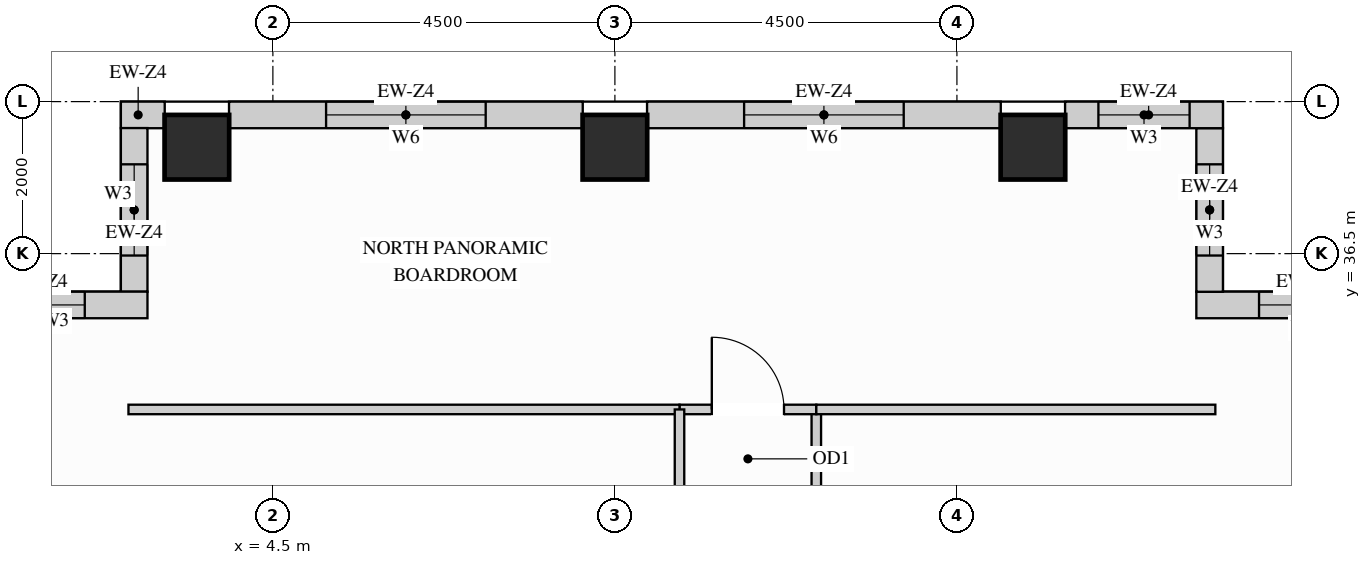
"""IFC4 building model, lengths in metres.
Left out: names, types, materials, properties, quantities, classifications, styles, units other than length and angle.
Written with IfcOpenShell. Run it as: python <this file> out.ifc"""

import sys

from ifc_helpers import new_model, si_unit, direction, frame, frame_2d, origin, origin_2d, place, context, subcontext, project, spatial, rectangle, extrude, source, transform, mapped, element, fill, save


model = new_model("IFC4")
c1 = context("Model", 3, precision=1e-05, world=origin(), true_north=direction((0.0, 1.0)))
c2 = subcontext(c1, "Body", "Model", "MODEL_VIEW")
j1 = project(units=[si_unit("LENGTHUNIT", "METRE"), si_unit("PLANEANGLEUNIT", "RADIAN")], contexts=[c1])
p1 = place(None, origin())
s1 = spatial("IfcSite", under=j1, at=p1, CompositionType="ELEMENT")
p2 = place(p1, origin())
s2 = spatial("IfcBuilding", under=s1, at=p2, CompositionType="ELEMENT")
p3 = place(p2, frame((0.0, 0.0, 248.4)))
s3 = spatial("IfcBuildingStorey", under=s2, at=p3, CompositionType="ELEMENT", Elevation=248.4)
m1 = source(origin(), c2, "Body", "SweptSolid", [
    extrude(rectangle(XDim=0.85, YDim=0.85, at=origin_2d()), origin(), (0.0, 0.0, 1.0), 3.4),
])
for number, where, z_axis, x_axis in (
    (1, (14.5, 37.9, 0.0), (0.0, 0.0, 1.0), (1.0, 0.0, 0.0)),
    (2, (3.5, 37.9, 0.0), (0.0, 0.0, 1.0), (1.0, 0.0, 0.0)),
    (3, (9.0, 37.9, 0.0), (0.0, 0.0, 1.0), (1.0, 0.0, 0.0)),
):
    element("IfcColumn", number, at=place(p3, frame(where, z_axis=z_axis, x_axis=x_axis)), inside=s3, PredefinedType="COLUMN", context=c2, shape_type="MappedRepresentation", body=[
        mapped(m1, transform((0.0, 0.0, 0.0), x_axis=(1.0, 0.0, 0.0), y_axis=(0.0, 1.0, 0.0), z_axis=(0.0, 0.0, 1.0))),
    ])
p4 = place(p3, frame((19.5, 35.825, 0.0), z_axis=(0.0, 0.0, 1.0), x_axis=(-1.0, 0.0, 0.0)))
e4 = element("IfcWall", 4, at=p4, inside=s3, PredefinedType="SOLIDWALL", context=c2, shape_type="SweptSolid", body=[
    extrude(rectangle(XDim=2.85, YDim=0.35, at=frame_2d((1.425, 0.0))), origin(), (0.0, 0.0, 1.0), 3.385),
])
p5 = place(p4, frame((0.825, 0.0, 0.78)))
e5 = element("IfcOpeningElement", 5, at=p5, cuts=e4, PredefinedType="OPENING", context=c2, shape_type="SweptSolid", body=[
    extrude(rectangle(XDim=1.2, YDim=2.25, at=frame_2d((0.6, 1.125))), frame((0.0, 0.185, 0.0), z_axis=(0.0, -1.0, 0.0), x_axis=(1.0, 0.0, 0.0)), (0.0, 0.0, 1.0), 0.37),
])
p6 = place(p3, frame((16.825, 35.998, 0.0), z_axis=(0.0, 0.0, 1.0), x_axis=(0.0, 1.0, 0.0)))
e6 = element("IfcWall", 6, at=p6, inside=s3, PredefinedType="SOLIDWALL", context=c2, shape_type="SweptSolid", body=[
    extrude(rectangle(XDim=2.154, YDim=0.35, at=frame_2d((1.077, 0.0))), origin(), (0.0, 0.0, 1.0), 3.385),
])
p7 = place(p6, frame((0.477, 0.0, 0.78)))
e7 = element("IfcOpeningElement", 7, at=p7, cuts=e6, PredefinedType="OPENING", context=c2, shape_type="SweptSolid", body=[
    extrude(rectangle(XDim=1.2, YDim=2.25, at=frame_2d((0.6, 1.125))), frame((0.0, 0.185, 0.0), z_axis=(0.0, -1.0, 0.0), x_axis=(1.0, 0.0, 0.0)), (0.0, 0.0, 1.0), 0.37),
])
p8 = place(p3, frame((17.0, 38.325, 0.0), z_axis=(0.0, 0.0, 1.0), x_axis=(-1.0, 0.0, 0.0)))
e8 = element("IfcWall", 8, at=p8, inside=s3, PredefinedType="SOLIDWALL", context=c2, shape_type="SweptSolid", body=[
    extrude(rectangle(XDim=2.077, YDim=0.35, at=frame_2d((1.039, 0.0))), origin(), (0.0, 0.0, 1.0), 3.385),
])
p9 = place(p8, frame((0.438, 0.0, 0.78)))
e9 = element("IfcOpeningElement", 9, at=p9, cuts=e8, PredefinedType="OPENING", context=c2, shape_type="SweptSolid", body=[
    extrude(rectangle(XDim=1.2, YDim=2.25, at=frame_2d((0.6, 1.125))), frame((0.0, 0.185, 0.0), z_axis=(0.0, -1.0, 0.0), x_axis=(1.0, 0.0, 0.0)), (0.0, 0.0, 1.0), 0.37),
])
p10 = place(p3, frame((14.077, 38.325, 0.0), z_axis=(0.0, 0.0, 1.0), x_axis=(-1.0, 0.0, 0.0)))
e10 = element("IfcWall", 10, at=p10, inside=s3, PredefinedType="SOLIDWALL", context=c2, shape_type="SweptSolid", body=[
    extrude(rectangle(XDim=4.654, YDim=0.35, at=frame_2d((2.327, 0.0))), origin(), (0.0, 0.0, 1.0), 3.385),
])
p11 = place(p10, frame((1.277, 0.0, 0.78)))
e11 = element("IfcOpeningElement", 11, at=p11, cuts=e10, PredefinedType="OPENING", context=c2, shape_type="SweptSolid", body=[
    extrude(rectangle(XDim=2.1, YDim=2.25, at=frame_2d((1.05, 1.125))), frame((0.0, 0.185, 0.0), z_axis=(0.0, -1.0, 0.0), x_axis=(1.0, 0.0, 0.0)), (0.0, 0.0, 1.0), 0.37),
])
p12 = place(p3, frame((8.577, 38.325, 0.0), z_axis=(0.0, 0.0, 1.0), x_axis=(-1.0, 0.0, 0.0)))
e12 = element("IfcWall", 12, at=p12, inside=s3, PredefinedType="SOLIDWALL", context=c2, shape_type="SweptSolid", body=[
    extrude(rectangle(XDim=4.654, YDim=0.35, at=frame_2d((2.327, 0.0))), origin(), (0.0, 0.0, 1.0), 3.385),
])
p13 = place(p12, frame((1.277, 0.0, 0.78)))
e13 = element("IfcOpeningElement", 13, at=p13, cuts=e12, PredefinedType="OPENING", context=c2, shape_type="SweptSolid", body=[
    extrude(rectangle(XDim=2.1, YDim=2.25, at=frame_2d((1.05, 1.125))), frame((0.0, 0.185, 0.0), z_axis=(0.0, -1.0, 0.0), x_axis=(1.0, 0.0, 0.0)), (0.0, 0.0, 1.0), 0.37),
])
m2 = source(origin(), c2, "Body", "SweptSolid", [
    extrude(rectangle(XDim=0.577, YDim=0.35, at=frame_2d((0.289, 0.0))), origin(), (0.0, 0.0, 1.0), 3.385),
])
p14 = place(p3, frame((3.077, 38.325, 0.0), z_axis=(0.0, 0.0, 1.0), x_axis=(-1.0, 0.0, 0.0)))
e14 = element("IfcWall", 14, at=p14, inside=s3, PredefinedType="SOLIDWALL", context=c2, shape_type="MappedRepresentation", body=[
    mapped(m2, transform((0.0, 0.0, 0.0), x_axis=(1.0, 0.0, 0.0), y_axis=(0.0, 1.0, 0.0), z_axis=(0.0, 0.0, 1.0))),
])
p15 = place(p3, frame((2.675, 38.152, 0.0), z_axis=(0.0, 0.0, 1.0), x_axis=(0.0, -1.0, 0.0)))
e15 = element("IfcWall", 15, at=p15, inside=s3, PredefinedType="SOLIDWALL", context=c2, shape_type="SweptSolid", body=[
    extrude(rectangle(XDim=2.154, YDim=0.35, at=frame_2d((1.077, 0.0))), origin(), (0.0, 0.0, 1.0), 3.385),
])
p16 = place(p15, frame((0.477, 0.0, 0.78)))
e16 = element("IfcOpeningElement", 16, at=p16, cuts=e15, PredefinedType="OPENING", context=c2, shape_type="SweptSolid", body=[
    extrude(rectangle(XDim=1.2, YDim=2.25, at=frame_2d((0.6, 1.125))), frame((0.0, 0.185, 0.0), z_axis=(0.0, -1.0, 0.0), x_axis=(1.0, 0.0, 0.0)), (0.0, 0.0, 1.0), 0.37),
])
p17 = place(p3, frame((2.85, 35.825, 0.0), z_axis=(0.0, 0.0, 1.0), x_axis=(-1.0, 0.0, 0.0)))
e17 = element("IfcWall", 17, at=p17, inside=s3, PredefinedType="SOLIDWALL", context=c2, shape_type="SweptSolid", body=[
    extrude(rectangle(XDim=2.85, YDim=0.35, at=frame_2d((1.425, 0.0))), origin(), (0.0, 0.0, 1.0), 3.385),
])
p18 = place(p17, frame((0.825, 0.0, 0.78)))
e18 = element("IfcOpeningElement", 18, at=p18, cuts=e17, PredefinedType="OPENING", context=c2, shape_type="SweptSolid", body=[
    extrude(rectangle(XDim=1.2, YDim=2.25, at=frame_2d((0.6, 1.125))), frame((0.0, 0.185, 0.0), z_axis=(0.0, -1.0, 0.0), x_axis=(1.0, 0.0, 0.0)), (0.0, 0.0, 1.0), 0.37),
])
p19 = place(p3, frame((11.65, 31.35, 0.0), z_axis=(0.0, 0.0, 1.0), x_axis=(0.0, 1.0, 0.0)))
e19 = element("IfcWall", 19, at=p19, inside=s3, PredefinedType="PARTITIONING", context=c2, shape_type="SweptSolid", body=[
    extrude(rectangle(XDim=3.1, YDim=0.125, at=frame_2d((1.55, 0.0))), origin(), (0.0, 0.0, 1.0), 3.385),
])
p20 = place(p19, frame((1.075, 0.0, 0.0)))
e20 = element("IfcOpeningElement", 20, at=p20, cuts=e19, PredefinedType="OPENING", context=c2, shape_type="SweptSolid", body=[
    extrude(rectangle(XDim=0.95, YDim=2.15, at=frame_2d((0.475, 1.075))), frame((0.0, 0.073, 0.0), z_axis=(0.0, -1.0, 0.0), x_axis=(1.0, 0.0, 0.0)), (0.0, 0.0, 1.0), 0.145),
])
p21 = place(p3, frame((9.85, 34.45, 0.0), z_axis=(0.0, 0.0, 1.0), x_axis=(1.0, 0.0, 0.0)))
e21 = element("IfcWall", 21, at=p21, inside=s3, PredefinedType="PARTITIONING", context=c2, shape_type="SweptSolid", body=[
    extrude(rectangle(XDim=1.8, YDim=0.125, at=frame_2d((0.9, 0.0))), origin(), (0.0, 0.0, 1.0), 3.385),
])
p22 = place(p21, frame((0.425, 0.0, 0.0)))
e22 = element("IfcOpeningElement", 22, at=p22, cuts=e21, PredefinedType="OPENING", context=c2, shape_type="SweptSolid", body=[
    extrude(rectangle(XDim=0.95, YDim=2.15, at=frame_2d((0.475, 1.075))), frame((0.0, 0.073, 0.0), z_axis=(0.0, -1.0, 0.0), x_axis=(1.0, 0.0, 0.0)), (0.0, 0.0, 1.0), 0.145),
])
m3 = source(origin(), c2, "Body", "SweptSolid", [
    extrude(rectangle(XDim=5.25, YDim=0.125, at=frame_2d((2.625, 0.0))), origin(), (0.0, 0.0, 1.0), 3.385),
])
p23 = place(p3, frame((11.65, 34.45, 0.0), z_axis=(0.0, 0.0, 1.0), x_axis=(1.0, 0.0, 0.0)))
e23 = element("IfcWall", 23, at=p23, inside=s3, PredefinedType="PARTITIONING", context=c2, shape_type="MappedRepresentation", body=[
    mapped(m3, transform((0.0, 0.0, 0.0), x_axis=(1.0, 0.0, 0.0), y_axis=(0.0, 1.0, 0.0), z_axis=(0.0, 0.0, 1.0))),
])
m4 = source(origin(), c2, "Body", "SweptSolid", [
    extrude(rectangle(XDim=7.25, YDim=0.125, at=frame_2d((3.625, 0.0))), origin(), (0.0, 0.0, 1.0), 3.385),
])
p24 = place(p3, frame((2.6, 34.45, 0.0), z_axis=(0.0, 0.0, 1.0), x_axis=(1.0, 0.0, 0.0)))
e24 = element("IfcWall", 24, at=p24, inside=s3, PredefinedType="PARTITIONING", context=c2, shape_type="MappedRepresentation", body=[
    mapped(m4, transform((0.0, 0.0, 0.0), x_axis=(1.0, 0.0, 0.0), y_axis=(0.0, 1.0, 0.0), z_axis=(0.0, 0.0, 1.0))),
])
p25 = place(p3, frame((9.85, 31.35, 0.0), z_axis=(0.0, 0.0, 1.0), x_axis=(0.0, 1.0, 0.0)))
e25 = element("IfcWall", 25, at=p25, inside=s3, PredefinedType="PARTITIONING", context=c2, shape_type="SweptSolid", body=[
    extrude(rectangle(XDim=3.1, YDim=0.125, at=frame_2d((1.55, 0.0))), origin(), (0.0, 0.0, 1.0), 3.385),
])
p26 = place(p25, frame((1.075, 0.0, 0.0)))
e26 = element("IfcOpeningElement", 26, at=p26, cuts=e25, PredefinedType="OPENING", context=c2, shape_type="SweptSolid", body=[
    extrude(rectangle(XDim=0.95, YDim=2.15, at=frame_2d((0.475, 1.075))), frame((0.0, 0.073, 0.0), z_axis=(0.0, -1.0, 0.0), x_axis=(1.0, 0.0, 0.0)), (0.0, 0.0, 1.0), 0.145),
])
m5 = source(origin(), c2, "Body", "SweptSolid", [
    extrude(rectangle(XDim=0.95, YDim=2.15, at=frame_2d((0.475, 1.075))), frame((0.0, 0.025, 0.0), z_axis=(0.0, -1.0, 0.0), x_axis=(1.0, 0.0, 0.0)), (0.0, 0.0, 1.0), 0.05),
])
p27 = place(p22, origin())
e27 = element("IfcDoor", 27, at=p27, inside=s3, OperationType="SINGLE_SWING_LEFT", PredefinedType="DOOR", context=c2, shape_type="MappedRepresentation", body=[
    mapped(m5, transform((0.0, 0.0, 0.0), x_axis=(1.0, 0.0, 0.0), y_axis=(0.0, 1.0, 0.0), z_axis=(0.0, 0.0, 1.0))),
])
fill(e22, e27)
m6 = source(origin(), c2, "Body", "SweptSolid", [
    extrude(rectangle(XDim=1.2, YDim=2.25, at=frame_2d((0.6, 1.125))), frame((0.0, 0.03, 0.0), z_axis=(0.0, -1.0, 0.0), x_axis=(1.0, 0.0, 0.0)), (0.0, 0.0, 1.0), 0.06),
])
p28 = place(p5, origin())
e28 = element("IfcWindow", 28, at=p28, inside=s3, PartitioningType="SINGLE_PANEL", PredefinedType="WINDOW", context=c2, shape_type="MappedRepresentation", body=[
    mapped(m6, transform((0.0, 0.0, 0.0), x_axis=(1.0, 0.0, 0.0), y_axis=(0.0, 1.0, 0.0), z_axis=(0.0, 0.0, 1.0))),
])
fill(e5, e28)
p29 = place(p7, origin())
e29 = element("IfcWindow", 29, at=p29, inside=s3, PartitioningType="SINGLE_PANEL", PredefinedType="WINDOW", context=c2, shape_type="MappedRepresentation", body=[
    mapped(m6, transform((0.0, 0.0, 0.0), x_axis=(1.0, 0.0, 0.0), y_axis=(0.0, 1.0, 0.0), z_axis=(0.0, 0.0, 1.0))),
])
fill(e7, e29)
p30 = place(p9, origin())
e30 = element("IfcWindow", 30, at=p30, inside=s3, PartitioningType="SINGLE_PANEL", PredefinedType="WINDOW", context=c2, shape_type="MappedRepresentation", body=[
    mapped(m6, transform((0.0, 0.0, 0.0), x_axis=(1.0, 0.0, 0.0), y_axis=(0.0, 1.0, 0.0), z_axis=(0.0, 0.0, 1.0))),
])
fill(e9, e30)
p31 = place(p16, origin())
e31 = element("IfcWindow", 31, at=p31, inside=s3, PartitioningType="SINGLE_PANEL", PredefinedType="WINDOW", context=c2, shape_type="MappedRepresentation", body=[
    mapped(m6, transform((0.0, 0.0, 0.0), x_axis=(1.0, 0.0, 0.0), y_axis=(0.0, 1.0, 0.0), z_axis=(0.0, 0.0, 1.0))),
])
fill(e16, e31)
p32 = place(p18, origin())
e32 = element("IfcWindow", 32, at=p32, inside=s3, PartitioningType="SINGLE_PANEL", PredefinedType="WINDOW", context=c2, shape_type="MappedRepresentation", body=[
    mapped(m6, transform((0.0, 0.0, 0.0), x_axis=(1.0, 0.0, 0.0), y_axis=(0.0, 1.0, 0.0), z_axis=(0.0, 0.0, 1.0))),
])
fill(e18, e32)
m7 = source(origin(), c2, "Body", "SweptSolid", [
    extrude(rectangle(XDim=2.1, YDim=2.25, at=frame_2d((1.05, 1.125))), frame((0.0, 0.03, 0.0), z_axis=(0.0, -1.0, 0.0), x_axis=(1.0, 0.0, 0.0)), (0.0, 0.0, 1.0), 0.06),
])
p33 = place(p11, origin())
e33 = element("IfcWindow", 33, at=p33, inside=s3, PartitioningType="SINGLE_PANEL", PredefinedType="WINDOW", context=c2, shape_type="MappedRepresentation", body=[
    mapped(m7, transform((0.0, 0.0, 0.0), x_axis=(1.0, 0.0, 0.0), y_axis=(0.0, 1.0, 0.0), z_axis=(0.0, 0.0, 1.0))),
])
fill(e11, e33)
p34 = place(p13, origin())
e34 = element("IfcWindow", 34, at=p34, inside=s3, PartitioningType="SINGLE_PANEL", PredefinedType="WINDOW", context=c2, shape_type="MappedRepresentation", body=[
    mapped(m7, transform((0.0, 0.0, 0.0), x_axis=(1.0, 0.0, 0.0), y_axis=(0.0, 1.0, 0.0), z_axis=(0.0, 0.0, 1.0))),
])
fill(e13, e34)
save(model, sys.argv[1])
